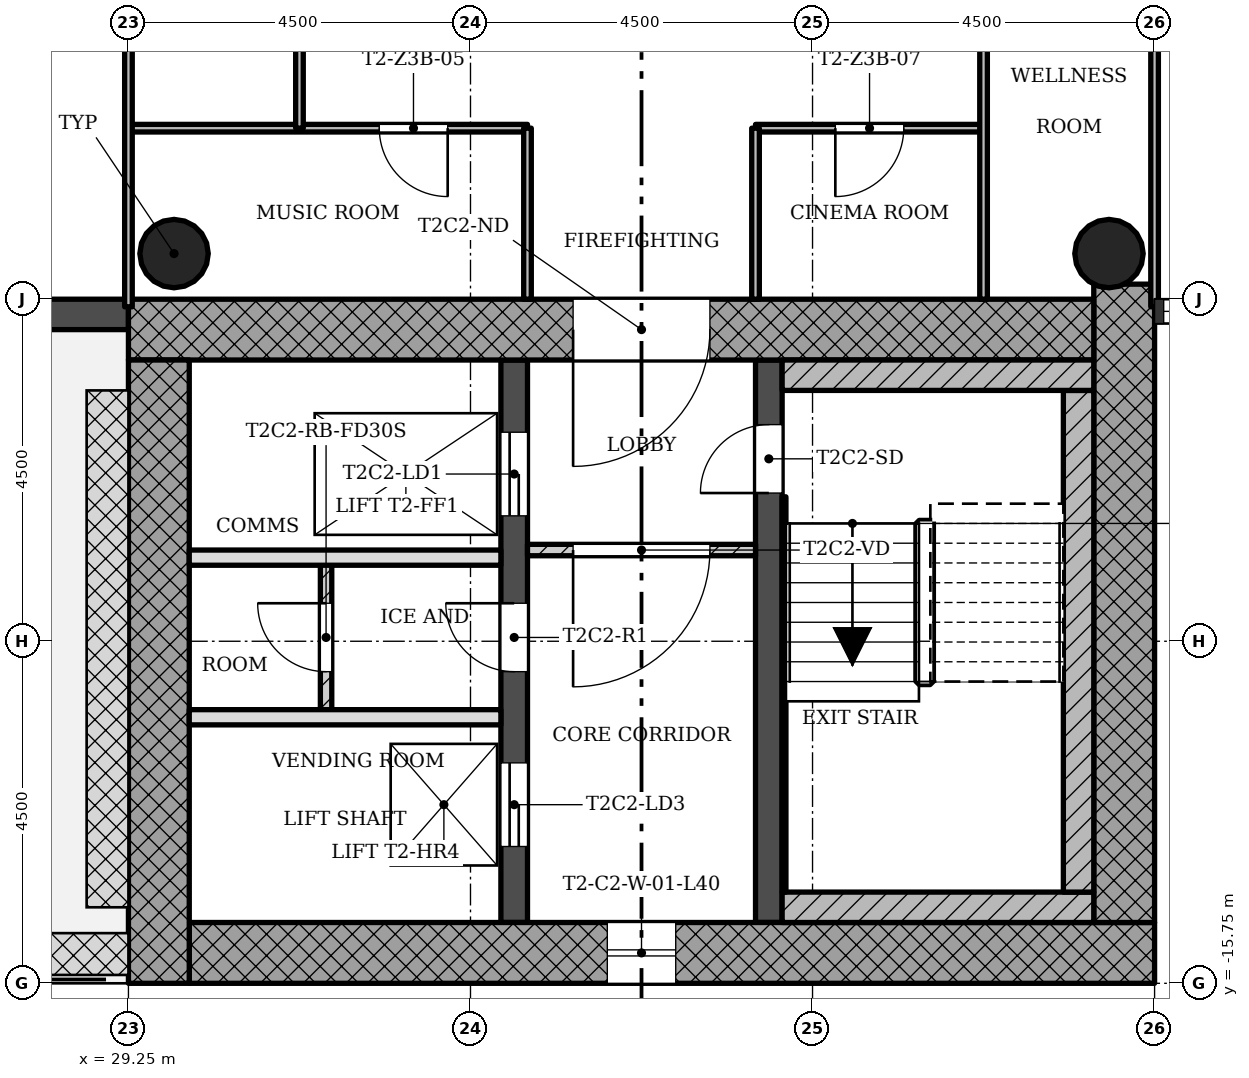
"""IFC4 building model, lengths in metres.
Left out: names, types, materials, properties, quantities, classifications, styles, units other than length and angle.
Written with IfcOpenShell. Run it as: python <this file> out.ifc"""

import sys

from ifc_helpers import new_model, si_unit, direction, frame, frame_2d, origin, origin_2d, place, context, subcontext, project, spatial, rectangle, hollow_circle, extrude, element, fill, save


model = new_model("IFC4")
c1 = context("Model", 3, precision=1e-05, world=origin(), true_north=direction((0.0, 1.0)))
c2 = subcontext(c1, "Body", "Model", "MODEL_VIEW")
j1 = project(units=[si_unit("LENGTHUNIT", "METRE"), si_unit("PLANEANGLEUNIT", "RADIAN")], contexts=[c1])
p1 = place(None, origin())
s1 = spatial("IfcSite", under=j1, at=p1, CompositionType="ELEMENT")
p2 = place(p1, origin())
s2 = spatial("IfcBuilding", under=s1, at=p2, CompositionType="ELEMENT")
p3 = place(p2, frame((0.0, 0.0, 147.3)))
s3 = spatial("IfcBuildingStorey", under=s2, at=p3, CompositionType="ELEMENT", Elevation=147.3)
p4 = place(p3, frame((30.05, -15.35, 0.0), z_axis=(0.0, 0.0, 1.0), x_axis=(1.0, 0.0, 0.0)))
e1 = element("IfcWall", 1, at=p4, inside=s3, PredefinedType="SHEAR", context=c2, shape_type="SweptSolid", body=[
    extrude(rectangle(XDim=12.7, YDim=0.8, at=frame_2d((6.35, 0.0))), origin(), (0.0, 0.0, 1.0), 3.4),
])
p5 = place(p4, frame((5.5, 0.0, 0.45)))
e2 = element("IfcOpeningElement", 2, at=p5, cuts=e1, PredefinedType="OPENING", context=c2, shape_type="SweptSolid", body=[
    extrude(rectangle(XDim=0.9, YDim=2.4, at=frame_2d((0.45, 1.2))), frame((0.0, 0.41, 0.0), z_axis=(0.0, -1.0, 0.0), x_axis=(1.0, 0.0, 0.0)), (0.0, 0.0, 1.0), 0.82),
])
p6 = place(p3, frame((42.35, -14.95, 0.0), z_axis=(0.0, 0.0, 1.0), x_axis=(0.0, 1.0, 0.0)))
e3 = element("IfcWall", 3, at=p6, inside=s3, PredefinedType="SHEAR", context=c2, shape_type="SweptSolid", body=[
    extrude(rectangle(XDim=8.398, YDim=0.8, at=frame_2d((4.199, 0.0))), origin(), (0.0, 0.0, 1.0), 3.4),
])
p7 = place(p3, frame((41.95, -7.15, 0.0), z_axis=(0.0, 0.0, 1.0), x_axis=(-1.0, 0.0, 0.0)))
e4 = element("IfcWall", 4, at=p7, inside=s3, PredefinedType="SHEAR", context=c2, shape_type="SweptSolid", body=[
    extrude(rectangle(XDim=12.7, YDim=0.8, at=frame_2d((6.35, 0.0))), origin(), (0.0, 0.0, 1.0), 3.4),
])
p8 = place(p7, frame((5.05, 0.0, 0.0)))
e5 = element("IfcOpeningElement", 5, at=p8, cuts=e4, PredefinedType="OPENING", context=c2, shape_type="SweptSolid", body=[
    extrude(rectangle(XDim=1.8, YDim=2.1, at=frame_2d((0.9, 1.05))), frame((0.0, 0.41, 0.0), z_axis=(0.0, -1.0, 0.0), x_axis=(1.0, 0.0, 0.0)), (0.0, 0.0, 1.0), 0.82),
])
p9 = place(p3, frame((29.65, -7.55, 0.0), z_axis=(0.0, 0.0, 1.0), x_axis=(0.0, -1.0, 0.0)))
e6 = element("IfcWall", 6, at=p9, inside=s3, PredefinedType="SHEAR", context=c2, shape_type="SweptSolid", body=[
    extrude(rectangle(XDim=8.2, YDim=0.8, at=frame_2d((4.1, 0.0))), origin(), (0.0, 0.0, 1.0), 3.4),
])
p10 = place(p3, frame((34.325, -14.95, 0.0), z_axis=(0.0, 0.0, 1.0), x_axis=(0.0, 1.0, 0.0)))
e7 = element("IfcWall", 7, at=p10, inside=s3, PredefinedType="SHEAR", context=c2, shape_type="SweptSolid", body=[
    extrude(rectangle(XDim=7.4, YDim=0.35, at=frame_2d((3.7, 0.0))), origin(), (0.0, 0.0, 1.0), 3.4),
])
p11 = place(p10, frame((5.35, 0.0, 0.0)))
e8 = element("IfcOpeningElement", 8, at=p11, cuts=e7, PredefinedType="OPENING", context=c2, shape_type="SweptSolid", body=[
    extrude(rectangle(XDim=1.1, YDim=2.1, at=frame_2d((0.55, 1.05))), frame((0.0, 0.185, 0.0), z_axis=(0.0, -1.0, 0.0), x_axis=(1.0, 0.0, 0.0)), (0.0, 0.0, 1.0), 0.37),
])
p12 = place(p10, frame((1.0, 0.0, 0.0)))
e9 = element("IfcOpeningElement", 9, at=p12, cuts=e7, PredefinedType="OPENING", context=c2, shape_type="SweptSolid", body=[
    extrude(rectangle(XDim=1.1, YDim=2.1, at=frame_2d((0.55, 1.05))), frame((0.0, 0.185, 0.0), z_axis=(0.0, -1.0, 0.0), x_axis=(1.0, 0.0, 0.0)), (0.0, 0.0, 1.0), 0.37),
])
p13 = place(p10, frame((3.3, 0.0, 0.0)))
e10 = element("IfcOpeningElement", 10, at=p13, cuts=e7, PredefinedType="OPENING", context=c2, shape_type="SweptSolid", body=[
    extrude(rectangle(XDim=0.9, YDim=2.1, at=frame_2d((0.45, 1.05))), frame((0.0, 0.185, 0.0), z_axis=(0.0, -1.0, 0.0), x_axis=(1.0, 0.0, 0.0)), (0.0, 0.0, 1.0), 0.37),
])
p14 = place(p3, frame((37.675, -14.95, 0.0), z_axis=(0.0, 0.0, 1.0), x_axis=(0.0, 1.0, 0.0)))
e11 = element("IfcWall", 11, at=p14, inside=s3, PredefinedType="SHEAR", context=c2, shape_type="SweptSolid", body=[
    extrude(rectangle(XDim=7.4, YDim=0.35, at=frame_2d((3.7, 0.0))), origin(), (0.0, 0.0, 1.0), 3.4),
])
p15 = place(p14, frame((5.65, 0.0, 0.0)))
e12 = element("IfcOpeningElement", 12, at=p15, cuts=e11, PredefinedType="OPENING", context=c2, shape_type="SweptSolid", body=[
    extrude(rectangle(XDim=0.9, YDim=2.1, at=frame_2d((0.45, 1.05))), frame((0.0, 0.185, 0.0), z_axis=(0.0, -1.0, 0.0), x_axis=(1.0, 0.0, 0.0)), (0.0, 0.0, 1.0), 0.37),
])
for number, where, z_axis, x_axis in (
    (13, (42.15, -6.15, 0.0), (0.0, 0.0, 1.0), (1.0, 0.0, 0.0)),
    (14, (29.85, -6.15, 0.0), (0.0, 0.0, 1.0), (1.0, 0.0, 0.0)),
):
    element("IfcColumn", number, at=place(p3, frame(where, z_axis=z_axis, x_axis=x_axis)), inside=s3, PredefinedType="COLUMN", context=c2, shape_type="SweptSolid", body=[
        extrude(hollow_circle(Radius=0.45, WallThickness=0.032, at=origin_2d()), origin(), (0.0, 0.0, 1.0), 3.4),
    ])
p16 = place(p3, frame((24.75, -6.95, -0.02), z_axis=(0.0, 0.0, 1.0), x_axis=(1.0, 0.0, 0.0)))
e15 = element("IfcWall", 15, at=p16, inside=s3, PredefinedType="STANDARD", context=c2, shape_type="SweptSolid", body=[
    extrude(rectangle(XDim=4.5, YDim=0.4, at=frame_2d((2.25, 0.0))), origin(), (0.0, 0.0, 1.0), 3.12),
])
p17 = place(p16, frame((1.35, 0.0, 0.02)))
e16 = element("IfcOpeningElement", 16, at=p17, cuts=e15, PredefinedType="OPENING", context=c2, shape_type="SweptSolid", body=[
    extrude(rectangle(XDim=1.8, YDim=2.1, at=frame_2d((0.9, 1.05))), frame((0.0, 0.21, 0.0), z_axis=(0.0, -1.0, 0.0), x_axis=(1.0, 0.0, 0.0)), (0.0, 0.0, 1.0), 0.42),
])
p18 = place(p3, frame((34.5, -10.05, 0.0), z_axis=(0.0, 0.0, 1.0), x_axis=(1.0, 0.0, 0.0)))
e17 = element("IfcWall", 17, at=p18, inside=s3, PredefinedType="PARTITIONING", context=c2, shape_type="SweptSolid", body=[
    extrude(rectangle(XDim=3.0, YDim=0.15, at=frame_2d((1.5, 0.0))), origin(), (0.0, 0.0, 1.0), 3.0),
])
p19 = place(p18, frame((0.6, 0.0, 0.0)))
e18 = element("IfcOpeningElement", 18, at=p19, cuts=e17, PredefinedType="OPENING", context=c2, shape_type="SweptSolid", body=[
    extrude(rectangle(XDim=1.8, YDim=2.1, at=frame_2d((0.9, 1.05))), frame((0.0, 0.085, 0.0), z_axis=(0.0, -1.0, 0.0), x_axis=(1.0, 0.0, 0.0)), (0.0, 0.0, 1.0), 0.17),
])
for number, where, z_axis, x_axis in (
    (19, (30.05, -12.25, 0.0), (0.0, 0.0, 1.0), (1.0, 0.0, 0.0)),
    (20, (30.05, -10.15, 0.0), (0.0, 0.0, 1.0), (1.0, 0.0, 0.0)),
):
    element("IfcWall", number, at=place(p3, frame(where, z_axis=z_axis, x_axis=x_axis)), inside=s3, PredefinedType="SOLIDWALL", context=c2, shape_type="SweptSolid", body=[
        extrude(rectangle(XDim=4.1, YDim=0.2, at=frame_2d((2.05, 0.0))), origin(), (0.0, 0.0, 1.0), 3.0),
    ])
p20 = place(p3, frame((31.85, -10.15, 0.0), z_axis=(0.0, 0.0, 1.0), x_axis=(0.0, -1.0, 0.0)))
e21 = element("IfcWall", 21, at=p20, inside=s3, PredefinedType="PARTITIONING", context=c2, shape_type="SweptSolid", body=[
    extrude(rectangle(XDim=2.1, YDim=0.15, at=frame_2d((1.05, 0.0))), origin(), (0.0, 0.0, 1.0), 3.0),
])
p21 = place(p20, frame((0.6, 0.0, 0.0)))
e22 = element("IfcOpeningElement", 22, at=p21, cuts=e21, PredefinedType="OPENING", context=c2, shape_type="SweptSolid", body=[
    extrude(rectangle(XDim=0.9, YDim=2.1, at=frame_2d((0.45, 1.05))), frame((0.0, 0.085, 0.0), z_axis=(0.0, -1.0, 0.0), x_axis=(1.0, 0.0, 0.0)), (0.0, 0.0, 1.0), 0.17),
])
p22 = place(p3, frame((40.5, -4.5, 0.0), z_axis=(0.0, 0.0, 1.0), x_axis=(-1.0, 0.0, 0.0)))
e23 = element("IfcWall", 23, at=p22, inside=s3, PredefinedType="PARTITIONING", context=c2, shape_type="SweptSolid", body=[
    extrude(rectangle(XDim=3.0, YDim=0.1, at=frame_2d((1.5, 0.0))), origin(), (0.0, 0.0, 1.0), 3.0),
])
p23 = place(p22, frame((1.05, 0.0, 0.0)))
e24 = element("IfcOpeningElement", 24, at=p23, cuts=e23, PredefinedType="OPENING", context=c2, shape_type="SweptSolid", body=[
    extrude(rectangle(XDim=0.9, YDim=2.1, at=frame_2d((0.45, 1.05))), frame((0.0, 0.06, 0.0), z_axis=(0.0, -1.0, 0.0), x_axis=(1.0, 0.0, 0.0)), (0.0, 0.0, 1.0), 0.12),
])
p24 = place(p3, frame((34.5, -4.5, 0.0), z_axis=(0.0, 0.0, 1.0), x_axis=(-1.0, 0.0, 0.0)))
e25 = element("IfcWall", 25, at=p24, inside=s3, PredefinedType="PARTITIONING", context=c2, shape_type="SweptSolid", body=[
    extrude(rectangle(XDim=5.25, YDim=0.1, at=frame_2d((2.625, 0.0))), origin(), (0.0, 0.0, 1.0), 3.0),
])
p25 = place(p24, frame((1.05, 0.0, 0.0)))
e26 = element("IfcOpeningElement", 26, at=p25, cuts=e25, PredefinedType="OPENING", context=c2, shape_type="SweptSolid", body=[
    extrude(rectangle(XDim=0.9, YDim=2.1, at=frame_2d((0.45, 1.05))), frame((0.0, 0.06, 0.0), z_axis=(0.0, -1.0, 0.0), x_axis=(1.0, 0.0, 0.0)), (0.0, 0.0, 1.0), 0.12),
])
p26 = place(p3, frame((42.75, -6.85, 0.0), z_axis=(0.0, 0.0, 1.0), x_axis=(0.0, 1.0, 0.0)))
e27 = element("IfcWall", 27, at=p26, inside=s3, PredefinedType="PARTITIONING", context=c2, shape_type="SweptSolid", body=[
    extrude(rectangle(XDim=5.95, YDim=0.1, at=frame_2d((2.975, 0.0))), origin(), (0.0, 0.0, 1.0), 3.0),
])
p27 = place(p3, frame((40.5, -6.75, 0.0), z_axis=(0.0, 0.0, 1.0), x_axis=(0.0, 1.0, 0.0)))
e28 = element("IfcWall", 28, at=p27, inside=s3, PredefinedType="PARTITIONING", context=c2, shape_type="SweptSolid", body=[
    extrude(rectangle(XDim=5.85, YDim=0.1, at=frame_2d((2.925, 0.0))), origin(), (0.0, 0.0, 1.0), 3.0),
])
p28 = place(p27, frame((3.6, 0.0, 0.0)))
e29 = element("IfcOpeningElement", 29, at=p28, cuts=e28, PredefinedType="OPENING", context=c2, shape_type="SweptSolid", body=[
    extrude(rectangle(XDim=0.9, YDim=2.1, at=frame_2d((0.45, 1.05))), frame((0.0, 0.06, 0.0), z_axis=(0.0, -1.0, 0.0), x_axis=(1.0, 0.0, 0.0)), (0.0, 0.0, 1.0), 0.12),
])
for number, where, z_axis, x_axis in (
    (30, (37.5, -6.75, 0.0), (0.0, 0.0, 1.0), (0.0, 1.0, 0.0)),
    (31, (34.5, -6.75, 0.0), (0.0, 0.0, 1.0), (0.0, 1.0, 0.0)),
):
    element("IfcWall", number, at=place(p3, frame(where, z_axis=z_axis, x_axis=x_axis)), inside=s3, PredefinedType="PARTITIONING", context=c2, shape_type="SweptSolid", body=[
        extrude(rectangle(XDim=2.25, YDim=0.1, at=frame_2d((1.125, 0.0))), origin(), (0.0, 0.0, 1.0), 3.0),
    ])
p29 = place(p3, frame((31.5, -4.5, 0.0), z_axis=(0.0, 0.0, 1.0), x_axis=(0.0, 1.0, 0.0)))
e32 = element("IfcWall", 32, at=p29, inside=s3, PredefinedType="PARTITIONING", context=c2, shape_type="SweptSolid", body=[
    extrude(rectangle(XDim=3.6, YDim=0.1, at=frame_2d((1.8, 0.0))), origin(), (0.0, 0.0, 1.0), 3.0),
])
p30 = place(p29, frame((1.35, 0.0, 0.0)))
e33 = element("IfcOpeningElement", 33, at=p30, cuts=e32, PredefinedType="OPENING", context=c2, shape_type="SweptSolid", body=[
    extrude(rectangle(XDim=0.9, YDim=2.1, at=frame_2d((0.45, 1.05))), frame((0.0, 0.06, 0.0), z_axis=(0.0, -1.0, 0.0), x_axis=(1.0, 0.0, 0.0)), (0.0, 0.0, 1.0), 0.12),
])
p31 = place(p3, frame((29.25, -6.85, 0.0), z_axis=(0.0, 0.0, 1.0), x_axis=(0.0, 1.0, 0.0)))
e34 = element("IfcWall", 34, at=p31, inside=s3, PredefinedType="PARTITIONING", context=c2, shape_type="SweptSolid", body=[
    extrude(rectangle(XDim=5.95, YDim=0.1, at=frame_2d((2.975, 0.0))), origin(), (0.0, 0.0, 1.0), 3.0),
])
p32 = place(p3, frame((37.85, -14.75, 0.0), z_axis=(0.0, 0.0, 1.0), x_axis=(1.0, 0.0, 0.0)))
e35 = element("IfcWall", 35, at=p32, inside=s3, PredefinedType="SHEAR", context=c2, shape_type="SweptSolid", body=[
    extrude(rectangle(XDim=4.1, YDim=0.4, at=frame_2d((2.05, 0.0))), origin(), (0.0, 0.0, 1.0), 3.4),
])
p33 = place(p3, frame((41.75, -7.95, 0.0), z_axis=(0.0, 0.0, 1.0), x_axis=(0.0, -1.0, 0.0)))
e36 = element("IfcWall", 36, at=p33, inside=s3, PredefinedType="SHEAR", context=c2, shape_type="SweptSolid", body=[
    extrude(rectangle(XDim=6.6, YDim=0.4, at=frame_2d((3.3, 0.0))), origin(), (0.0, 0.0, 1.0), 3.4),
])
p34 = place(p3, frame((37.85, -7.75, 0.0), z_axis=(0.0, 0.0, 1.0), x_axis=(1.0, 0.0, 0.0)))
e37 = element("IfcWall", 37, at=p34, inside=s3, PredefinedType="SHEAR", context=c2, shape_type="SweptSolid", body=[
    extrude(rectangle(XDim=4.1, YDim=0.4, at=frame_2d((2.05, 0.0))), origin(), (0.0, 0.0, 1.0), 3.4),
])
p35 = place(p3, frame((37.875, -9.35, 0.0), z_axis=(0.0, 0.0, 1.0), x_axis=(0.0, -1.0, 0.0)))
e38 = element("IfcWall", 38, at=p35, inside=s3, PredefinedType="SHEAR", context=c2, shape_type="SweptSolid", body=[
    extrude(rectangle(XDim=5.2, YDim=0.05, at=frame_2d((2.6, 0.0))), origin(), (0.0, 0.0, 1.0), 3.4),
])
p36 = place(p5, origin())
e39 = element("IfcWindow", 39, at=p36, inside=s3, PartitioningType="SINGLE_PANEL", PredefinedType="WINDOW", context=c2, shape_type="SweptSolid", body=[
    extrude(rectangle(XDim=0.9, YDim=2.4, at=frame_2d((0.45, 1.2))), frame((0.0, 0.03, 0.0), z_axis=(0.0, -1.0, 0.0), x_axis=(1.0, 0.0, 0.0)), (0.0, 0.0, 1.0), 0.06),
])
fill(e2, e39)
p37 = place(p19, origin())
e40 = element("IfcDoor", 40, at=p37, inside=s3, OperationType="SINGLE_SWING_LEFT", PredefinedType="DOOR", context=c2, shape_type="SweptSolid", body=[
    extrude(rectangle(XDim=1.8, YDim=2.1, at=frame_2d((0.9, 1.05))), frame((0.0, 0.025, 0.0), z_axis=(0.0, -1.0, 0.0), x_axis=(1.0, 0.0, 0.0)), (0.0, 0.0, 1.0), 0.05),
])
fill(e18, e40)
p38 = place(p21, origin())
e41 = element("IfcDoor", 41, at=p38, inside=s3, OperationType="SINGLE_SWING_LEFT", PredefinedType="DOOR", context=c2, shape_type="SweptSolid", body=[
    extrude(rectangle(XDim=0.9, YDim=2.1, at=frame_2d((0.45, 1.05))), frame((0.0, 0.025, 0.0), z_axis=(0.0, -1.0, 0.0), x_axis=(1.0, 0.0, 0.0)), (0.0, 0.0, 1.0), 0.05),
])
fill(e22, e41)
p39 = place(p25, origin())
e42 = element("IfcDoor", 42, at=p39, inside=s3, OperationType="SINGLE_SWING_RIGHT", PredefinedType="DOOR", context=c2, shape_type="SweptSolid", body=[
    extrude(rectangle(XDim=0.9, YDim=2.1, at=frame_2d((0.45, 1.05))), frame((0.0, 0.025, 0.0), z_axis=(0.0, -1.0, 0.0), x_axis=(1.0, 0.0, 0.0)), (0.0, 0.0, 1.0), 0.05),
])
fill(e26, e42)
p40 = place(p23, origin())
e43 = element("IfcDoor", 43, at=p40, inside=s3, OperationType="SINGLE_SWING_LEFT", PredefinedType="DOOR", context=c2, shape_type="SweptSolid", body=[
    extrude(rectangle(XDim=0.9, YDim=2.1, at=frame_2d((0.45, 1.05))), frame((0.0, 0.025, 0.0), z_axis=(0.0, -1.0, 0.0), x_axis=(1.0, 0.0, 0.0)), (0.0, 0.0, 1.0), 0.05),
])
fill(e24, e43)
p41 = place(p15, origin())
e44 = element("IfcDoor", 44, at=p41, inside=s3, OperationType="SINGLE_SWING_RIGHT", PredefinedType="DOOR", context=c2, shape_type="SweptSolid", body=[
    extrude(rectangle(XDim=0.9, YDim=2.1, at=frame_2d((0.45, 1.05))), frame((0.0, 0.025, 0.0), z_axis=(0.0, -1.0, 0.0), x_axis=(1.0, 0.0, 0.0)), (0.0, 0.0, 1.0), 0.05),
])
fill(e12, e44)
p42 = place(p11, origin())
e45 = element("IfcDoor", 45, at=p42, inside=s3, OperationType="SLIDING_TO_LEFT", PredefinedType="DOOR", context=c2, shape_type="SweptSolid", body=[
    extrude(rectangle(XDim=1.1, YDim=2.1, at=frame_2d((0.55, 1.05))), frame((0.0, 0.025, 0.0), z_axis=(0.0, -1.0, 0.0), x_axis=(1.0, 0.0, 0.0)), (0.0, 0.0, 1.0), 0.05),
])
fill(e8, e45)
p43 = place(p12, origin())
e46 = element("IfcDoor", 46, at=p43, inside=s3, OperationType="SLIDING_TO_LEFT", PredefinedType="DOOR", context=c2, shape_type="SweptSolid", body=[
    extrude(rectangle(XDim=1.1, YDim=2.1, at=frame_2d((0.55, 1.05))), frame((0.0, 0.025, 0.0), z_axis=(0.0, -1.0, 0.0), x_axis=(1.0, 0.0, 0.0)), (0.0, 0.0, 1.0), 0.05),
])
fill(e9, e46)
p44 = place(p13, origin())
e47 = element("IfcDoor", 47, at=p44, inside=s3, OperationType="SINGLE_SWING_LEFT", PredefinedType="DOOR", context=c2, shape_type="SweptSolid", body=[
    extrude(rectangle(XDim=0.9, YDim=2.1, at=frame_2d((0.45, 1.05))), frame((0.0, 0.025, 0.0), z_axis=(0.0, -1.0, 0.0), x_axis=(1.0, 0.0, 0.0)), (0.0, 0.0, 1.0), 0.05),
])
fill(e10, e47)
p45 = place(p8, origin())
e48 = element("IfcDoor", 48, at=p45, inside=s3, OperationType="SINGLE_SWING_LEFT", PredefinedType="DOOR", context=c2, shape_type="SweptSolid", body=[
    extrude(rectangle(XDim=1.8, YDim=2.1, at=frame_2d((0.9, 1.05))), frame((0.0, 0.025, 0.0), z_axis=(0.0, -1.0, 0.0), x_axis=(1.0, 0.0, 0.0)), (0.0, 0.0, 1.0), 0.05),
])
fill(e5, e48)
save(model, sys.argv[1])
